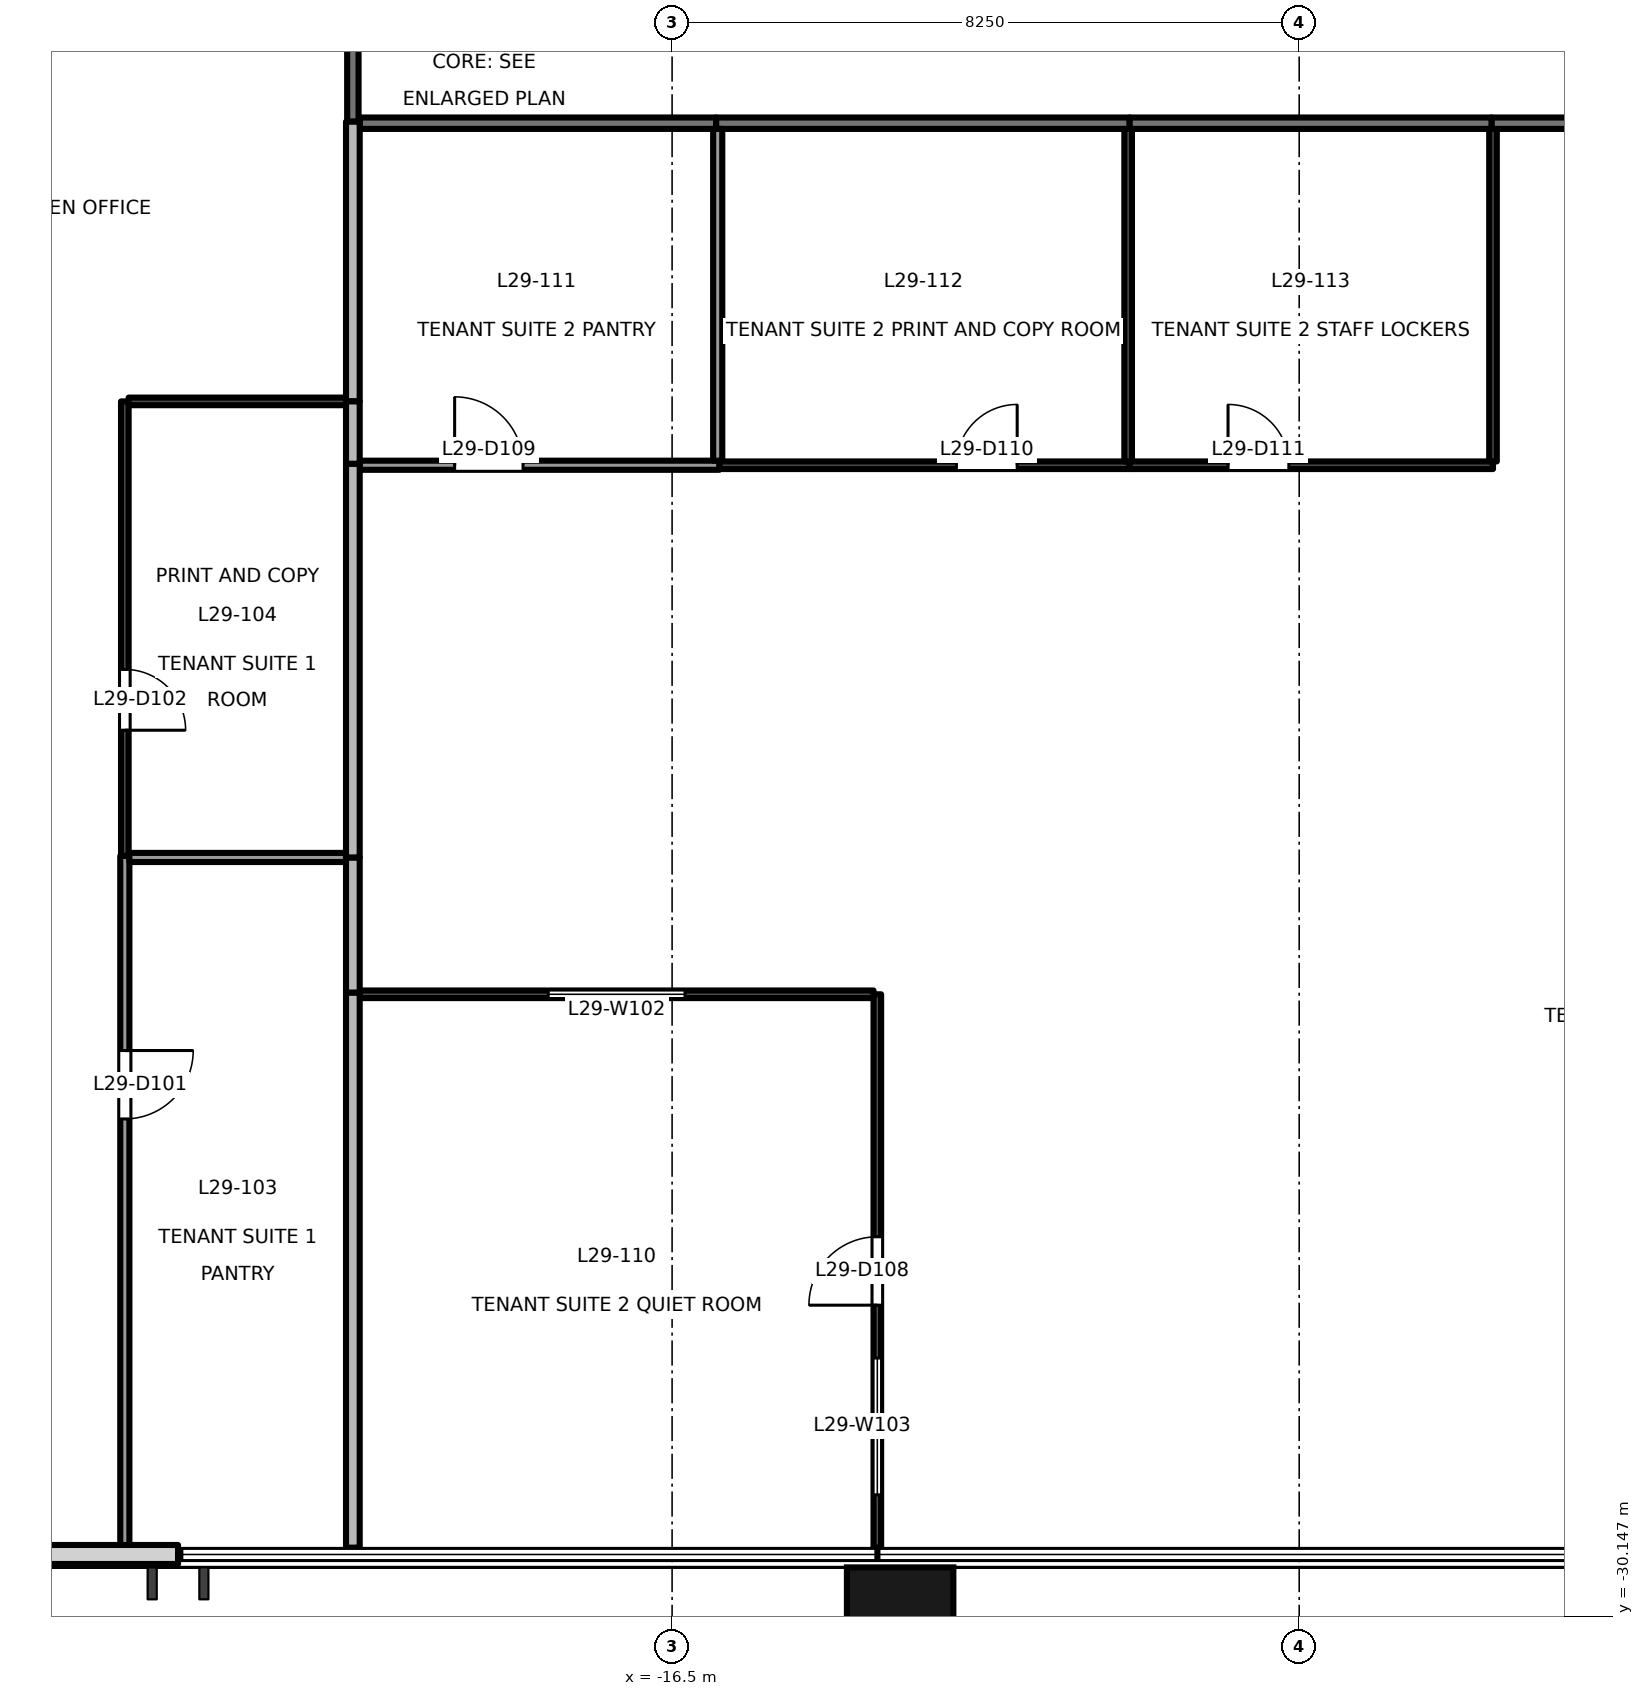
"""IFC4 building model, lengths in metres.
Left out: names, types, materials, properties, quantities, classifications, styles, units other than length and angle.
Written with IfcOpenShell. Run it as: python <this file> out.ifc"""

import sys

from ifc_helpers import new_model, si_unit, direction, frame, frame_2d, origin, origin_2d, place, context, subcontext, project, spatial, rectangle, extrude, element, fill, save


model = new_model("IFC4")
c1 = context("Model", 3, precision=1e-05, world=origin(), true_north=direction((0.0, 1.0)))
c2 = subcontext(c1, "Body", "Model", "MODEL_VIEW")
j1 = project(units=[si_unit("LENGTHUNIT", "METRE"), si_unit("PLANEANGLEUNIT", "RADIAN")], contexts=[c1])
p1 = place(None, origin())
s1 = spatial("IfcSite", under=j1, at=p1, CompositionType="ELEMENT")
p2 = place(p1, origin())
s2 = spatial("IfcBuilding", under=s1, at=p2, CompositionType="ELEMENT")
p3 = place(p2, frame((0.0, 0.0, 130.1)))
s3 = spatial("IfcBuildingStorey", under=s2, at=p3, CompositionType="ELEMENT", Elevation=130.1)
p4 = place(p3, frame((-13.5, -30.4, -0.2), z_axis=(0.0, 0.0, 1.0), x_axis=(1.0, 0.0, 0.0)))
e1 = element("IfcColumn", 1, at=p4, inside=s3, PredefinedType="COLUMN", context=c2, shape_type="SweptSolid", body=[
    extrude(rectangle(XDim=1.4, YDim=1.8, at=origin_2d()), origin(), (0.0, 0.0, 1.0), 4.0),
])
p5 = place(p3, frame((-25.955, -29.33, 0.0), z_axis=(0.0, 0.0, 1.0), x_axis=(1.0, 0.0, 0.0)))
e2 = element("IfcWall", 2, at=p5, inside=s3, PredefinedType="SOLIDWALL", context=c2, shape_type="SweptSolid", body=[
    extrude(rectangle(XDim=2.955, YDim=0.25, at=frame_2d((1.478, 0.0))), origin(), (0.0, 0.0, 1.0), 3.8),
])
p6 = place(p3, frame((-20.7, -10.48, 0.0), z_axis=(0.0, 0.0, 1.0), x_axis=(0.0, 1.0, 0.0)))
e3 = element("IfcWall", 3, at=p6, inside=s3, PredefinedType="PARTITIONING", context=c2, shape_type="SweptSolid", body=[
    extrude(rectangle(XDim=2.3, YDim=0.15, at=frame_2d((1.15, 0.0))), origin(), (0.0, 0.0, 1.0), 3.8),
])
p7 = place(p3, frame((0.32, -10.5, 0.0), z_axis=(0.0, 0.0, 1.0), x_axis=(-1.0, 0.0, 0.0)))
e4 = element("IfcWall", 4, at=p7, inside=s3, PredefinedType="PARTITIONING", context=c2, shape_type="SweptSolid", body=[
    extrude(rectangle(XDim=6.04, YDim=0.15, at=frame_2d((3.02, 0.0))), origin(), (0.0, 0.0, 1.0), 2.9),
])
p8 = place(p7, frame((2.12, 0.0, 0.0)))
e5 = element("IfcOpeningElement", 5, at=p8, cuts=e4, PredefinedType="OPENING", context=c2, shape_type="SweptSolid", body=[
    extrude(rectangle(XDim=1.8, YDim=2.1, at=frame_2d((0.9, 1.05))), frame((0.0, 0.085, 0.0), z_axis=(0.0, -1.0, 0.0), x_axis=(1.0, 0.0, 0.0)), (0.0, 0.0, 1.0), 0.171),
])
p9 = place(p3, frame((-15.92, -10.5, 0.0), z_axis=(0.0, 0.0, 1.0), x_axis=(-1.0, 0.0, 0.0)))
e6 = element("IfcWall", 6, at=p9, inside=s3, PredefinedType="PARTITIONING", context=c2, shape_type="SweptSolid", body=[
    extrude(rectangle(XDim=4.69, YDim=0.15, at=frame_2d((2.345, 0.0))), origin(), (0.0, 0.0, 1.0), 3.8),
])
p10 = place(p3, frame((-10.48, -10.5, 0.0), z_axis=(0.0, 0.0, 1.0), x_axis=(-1.0, 0.0, 0.0)))
e7 = element("IfcWall", 7, at=p10, inside=s3, PredefinedType="PARTITIONING", context=c2, shape_type="SweptSolid", body=[
    extrude(rectangle(XDim=5.44, YDim=0.15, at=frame_2d((2.72, 0.0))), origin(), (0.0, 0.0, 1.0), 2.9),
])
p11 = place(p3, frame((-5.72, -10.5, 0.0), z_axis=(0.0, 0.0, 1.0), x_axis=(-1.0, 0.0, 0.0)))
e8 = element("IfcWall", 8, at=p11, inside=s3, PredefinedType="PARTITIONING", context=c2, shape_type="SweptSolid", body=[
    extrude(rectangle(XDim=4.76, YDim=0.15, at=frame_2d((2.38, 0.0))), origin(), (0.0, 0.0, 1.0), 2.9),
])
p12 = place(p3, frame((-23.7, -20.14, 0.0), z_axis=(0.0, 0.0, 1.0), x_axis=(0.0, -1.0, 0.0)))
e9 = element("IfcWall", 9, at=p12, inside=s3, PredefinedType="PARTITIONING", context=c2, shape_type="SweptSolid", body=[
    extrude(rectangle(XDim=9.1, YDim=0.12, at=frame_2d((4.55, 0.0))), origin(), (0.0, 0.0, 1.0), 3.8),
])
p13 = place(p12, frame((2.56, 0.0, 0.0)))
e10 = element("IfcOpeningElement", 10, at=p13, cuts=e9, PredefinedType="OPENING", context=c2, shape_type="SweptSolid", body=[
    extrude(rectangle(XDim=0.9, YDim=2.1, at=frame_2d((0.45, 1.05))), frame((0.0, 0.071, 0.0), z_axis=(0.0, -1.0, 0.0), x_axis=(1.0, 0.0, 0.0)), (0.0, 0.0, 1.0), 0.141),
])
p14 = place(p3, frame((-23.7, -14.16, 0.0), z_axis=(0.0, 0.0, 1.0), x_axis=(0.0, -1.0, 0.0)))
e11 = element("IfcWall", 11, at=p14, inside=s3, PredefinedType="PARTITIONING", context=c2, shape_type="SweptSolid", body=[
    extrude(rectangle(XDim=5.98, YDim=0.1, at=frame_2d((2.99, 0.0))), origin(), (0.0, 0.0, 1.0), 3.8),
])
p15 = place(p14, frame((3.526, 0.0, 0.0)))
e12 = element("IfcOpeningElement", 12, at=p15, cuts=e11, PredefinedType="OPENING", context=c2, shape_type="SweptSolid", body=[
    extrude(rectangle(XDim=0.8, YDim=2.1, at=frame_2d((0.4, 1.05))), frame((0.0, 0.061, 0.0), z_axis=(0.0, -1.0, 0.0), x_axis=(1.0, 0.0, 0.0)), (0.0, 0.0, 1.0), 0.121),
])
p16 = place(p3, frame((-20.79, -14.16, 0.0), z_axis=(0.0, 0.0, 1.0), x_axis=(-1.0, 0.0, 0.0)))
e13 = element("IfcWall", 13, at=p16, inside=s3, PredefinedType="PARTITIONING", context=c2, shape_type="SweptSolid", body=[
    extrude(rectangle(XDim=2.86, YDim=0.1, at=frame_2d((1.43, 0.0))), origin(), (0.0, 0.0, 1.0), 3.8),
])
p17 = place(p3, frame((-20.7, -10.48, 0.0), z_axis=(0.0, 0.0, 1.0), x_axis=(0.0, -1.0, 0.0)))
e14 = element("IfcWall", 14, at=p17, inside=s3, PredefinedType="PARTITIONING", context=c2, shape_type="SweptSolid", body=[
    extrude(rectangle(XDim=3.68, YDim=0.18, at=frame_2d((1.84, 0.0))), origin(), (0.0, 0.0, 1.0), 3.8),
])
p18 = place(p3, frame((-23.64, -20.16, 0.0), z_axis=(0.0, 0.0, 1.0), x_axis=(1.0, 0.0, 0.0)))
e15 = element("IfcWall", 15, at=p18, inside=s3, PredefinedType="PARTITIONING", context=c2, shape_type="SweptSolid", body=[
    extrude(rectangle(XDim=2.85, YDim=0.12, at=frame_2d((1.425, 0.0))), origin(), (0.0, 0.0, 1.0), 3.8),
])
p19 = place(p3, frame((-20.7, -20.16, 0.0), z_axis=(0.0, 0.0, 1.0), x_axis=(0.0, -1.0, 0.0)))
e16 = element("IfcWall", 16, at=p19, inside=s3, PredefinedType="PARTITIONING", context=c2, shape_type="SweptSolid", body=[
    extrude(rectangle(XDim=1.78, YDim=0.18, at=frame_2d((0.89, 0.0))), origin(), (0.0, 0.0, 1.0), 3.8),
])
p20 = place(p3, frame((-20.7, -21.94, 0.0), z_axis=(0.0, 0.0, 1.0), x_axis=(0.0, -1.0, 0.0)))
e17 = element("IfcWall", 17, at=p20, inside=s3, PredefinedType="PARTITIONING", context=c2, shape_type="SweptSolid", body=[
    extrude(rectangle(XDim=7.3, YDim=0.18, at=frame_2d((3.65, 0.0))), origin(), (0.0, 0.0, 1.0), 3.8),
])
p21 = place(p3, frame((-20.7, -14.98, 0.0), z_axis=(0.0, 0.0, 1.0), x_axis=(0.0, -1.0, 0.0)))
e18 = element("IfcWall", 18, at=p21, inside=s3, PredefinedType="PARTITIONING", context=c2, shape_type="SweptSolid", body=[
    extrude(rectangle(XDim=5.18, YDim=0.18, at=frame_2d((2.59, 0.0))), origin(), (0.0, 0.0, 1.0), 3.8),
])
p22 = place(p3, frame((-20.7, -14.16, 0.0), z_axis=(0.0, 0.0, 1.0), x_axis=(0.0, -1.0, 0.0)))
e19 = element("IfcWall", 19, at=p22, inside=s3, PredefinedType="PARTITIONING", context=c2, shape_type="SweptSolid", body=[
    extrude(rectangle(XDim=0.82, YDim=0.18, at=frame_2d((0.41, 0.0))), origin(), (0.0, 0.0, 1.0), 3.8),
])
p23 = place(p3, frame((-13.85, -21.96, 0.0), z_axis=(0.0, 0.0, 1.0), x_axis=(-1.0, 0.0, 0.0)))
e20 = element("IfcWall", 20, at=p23, inside=s3, PredefinedType="PARTITIONING", context=c2, shape_type="SweptSolid", body=[
    extrude(rectangle(XDim=6.76, YDim=0.1, at=frame_2d((3.38, 0.0))), origin(), (0.0, 0.0, 1.0), 3.8),
])
p24 = place(p23, frame((2.48, 0.0, 0.9)))
e21 = element("IfcOpeningElement", 21, at=p24, cuts=e20, PredefinedType="OPENING", context=c2, shape_type="SweptSolid", body=[
    extrude(rectangle(XDim=1.8, YDim=1.2, at=frame_2d((0.9, 0.6))), frame((0.0, 0.061, 0.0), z_axis=(0.0, -1.0, 0.0), x_axis=(1.0, 0.0, 0.0)), (0.0, 0.0, 1.0), 0.121),
])
p25 = place(p3, frame((-13.8, -29.24, 0.0), z_axis=(0.0, 0.0, 1.0), x_axis=(0.0, 1.0, 0.0)))
e22 = element("IfcWall", 22, at=p25, inside=s3, PredefinedType="PARTITIONING", context=c2, shape_type="SweptSolid", body=[
    extrude(rectangle(XDim=7.28, YDim=0.1, at=frame_2d((3.64, 0.0))), origin(), (0.0, 0.0, 1.0), 3.8),
])
p26 = place(p25, frame((3.19, 0.0, 0.0)))
e23 = element("IfcOpeningElement", 23, at=p26, cuts=e22, PredefinedType="OPENING", context=c2, shape_type="SweptSolid", body=[
    extrude(rectangle(XDim=0.9, YDim=2.1, at=frame_2d((0.45, 1.05))), frame((0.0, 0.061, 0.0), z_axis=(0.0, -1.0, 0.0), x_axis=(1.0, 0.0, 0.0)), (0.0, 0.0, 1.0), 0.121),
])
p27 = place(p25, frame((0.695, 0.0, 0.9)))
e24 = element("IfcOpeningElement", 24, at=p27, cuts=e22, PredefinedType="OPENING", context=c2, shape_type="SweptSolid", body=[
    extrude(rectangle(XDim=1.8, YDim=1.2, at=frame_2d((0.9, 0.6))), frame((0.0, 0.061, 0.0), z_axis=(0.0, -1.0, 0.0), x_axis=(1.0, 0.0, 0.0)), (0.0, 0.0, 1.0), 0.121),
])
p28 = place(p3, frame((-20.61, -15.0, 0.0), z_axis=(0.0, 0.0, 1.0), x_axis=(1.0, 0.0, 0.0)))
e25 = element("IfcWall", 25, at=p28, inside=s3, PredefinedType="PARTITIONING", context=c2, shape_type="SweptSolid", body=[
    extrude(rectangle(XDim=4.73, YDim=0.12, at=frame_2d((2.365, 0.0))), origin(), (0.0, 0.0, 1.0), 3.8),
])
p29 = place(p28, frame((1.249, 0.0, 0.0)))
e26 = element("IfcOpeningElement", 26, at=p29, cuts=e25, PredefinedType="OPENING", context=c2, shape_type="SweptSolid", body=[
    extrude(rectangle(XDim=0.9, YDim=2.1, at=frame_2d((0.45, 1.05))), frame((0.0, 0.071, 0.0), z_axis=(0.0, -1.0, 0.0), x_axis=(1.0, 0.0, 0.0)), (0.0, 0.0, 1.0), 0.141),
])
p30 = place(p3, frame((-15.88, -15.0, 0.0), z_axis=(0.0, 0.0, 1.0), x_axis=(1.0, 0.0, 0.0)))
e27 = element("IfcWall", 27, at=p30, inside=s3, PredefinedType="PARTITIONING", context=c2, shape_type="SweptSolid", body=[
    extrude(rectangle(XDim=5.4, YDim=0.1, at=frame_2d((2.7, 0.0))), origin(), (0.0, 0.0, 1.0), 2.9),
])
p31 = place(p30, frame((3.12, 0.0, 0.0)))
e28 = element("IfcOpeningElement", 28, at=p31, cuts=e27, PredefinedType="OPENING", context=c2, shape_type="SweptSolid", body=[
    extrude(rectangle(XDim=0.8, YDim=2.1, at=frame_2d((0.4, 1.05))), frame((0.0, 0.061, 0.0), z_axis=(0.0, -1.0, 0.0), x_axis=(1.0, 0.0, 0.0)), (0.0, 0.0, 1.0), 0.121),
])
p32 = place(p3, frame((-10.48, -15.0, 0.0), z_axis=(0.0, 0.0, 1.0), x_axis=(1.0, 0.0, 0.0)))
e29 = element("IfcWall", 29, at=p32, inside=s3, PredefinedType="PARTITIONING", context=c2, shape_type="SweptSolid", body=[
    extrude(rectangle(XDim=4.78, YDim=0.1, at=frame_2d((2.39, 0.0))), origin(), (0.0, 0.0, 1.0), 2.9),
])
p33 = place(p32, frame((1.294, 0.0, 0.0)))
e30 = element("IfcOpeningElement", 30, at=p33, cuts=e29, PredefinedType="OPENING", context=c2, shape_type="SweptSolid", body=[
    extrude(rectangle(XDim=0.8, YDim=2.1, at=frame_2d((0.4, 1.05))), frame((0.0, 0.061, 0.0), z_axis=(0.0, -1.0, 0.0), x_axis=(1.0, 0.0, 0.0)), (0.0, 0.0, 1.0), 0.121),
])
p34 = place(p3, frame((-5.7, -14.95, 0.0), z_axis=(0.0, 0.0, 1.0), x_axis=(0.0, 1.0, 0.0)))
e31 = element("IfcWall", 31, at=p34, inside=s3, PredefinedType="PARTITIONING", context=c2, shape_type="SweptSolid", body=[
    extrude(rectangle(XDim=4.375, YDim=0.1, at=frame_2d((2.188, 0.0))), origin(), (0.0, 0.0, 1.0), 3.8),
])
p35 = place(p3, frame((-15.9, -10.575, 0.0), z_axis=(0.0, 0.0, 1.0), x_axis=(0.0, -1.0, 0.0)))
e32 = element("IfcWall", 32, at=p35, inside=s3, PredefinedType="PARTITIONING", context=c2, shape_type="SweptSolid", body=[
    extrude(rectangle(XDim=4.365, YDim=0.12, at=frame_2d((2.183, 0.0))), origin(), (0.0, 0.0, 1.0), 3.8),
])
p36 = place(p3, frame((-10.5, -10.575, 0.0), z_axis=(0.0, 0.0, 1.0), x_axis=(0.0, -1.0, 0.0)))
e33 = element("IfcWall", 33, at=p36, inside=s3, PredefinedType="PARTITIONING", context=c2, shape_type="SweptSolid", body=[
    extrude(rectangle(XDim=4.375, YDim=0.1, at=frame_2d((2.188, 0.0))), origin(), (0.0, 0.0, 1.0), 3.8),
])
p37 = place(p13, origin())
e34 = element("IfcDoor", 34, at=p37, inside=s3, OperationType="SINGLE_SWING_LEFT", PredefinedType="DOOR", context=c2, shape_type="SweptSolid", body=[
    extrude(rectangle(XDim=0.9, YDim=2.1, at=frame_2d((0.45, 1.05))), frame((0.0, 0.025, 0.0), z_axis=(0.0, -1.0, 0.0), x_axis=(1.0, 0.0, 0.0)), (0.0, 0.0, 1.0), 0.05),
])
fill(e10, e34)
p38 = place(p15, origin())
e35 = element("IfcDoor", 35, at=p38, inside=s3, OperationType="SINGLE_SWING_RIGHT", PredefinedType="DOOR", context=c2, shape_type="SweptSolid", body=[
    extrude(rectangle(XDim=0.8, YDim=2.1, at=frame_2d((0.4, 1.05))), frame((0.0, 0.025, 0.0), z_axis=(0.0, -1.0, 0.0), x_axis=(1.0, 0.0, 0.0)), (0.0, 0.0, 1.0), 0.05),
])
fill(e12, e35)
p39 = place(p26, origin())
e36 = element("IfcDoor", 36, at=p39, inside=s3, OperationType="SINGLE_SWING_LEFT", PredefinedType="DOOR", context=c2, shape_type="SweptSolid", body=[
    extrude(rectangle(XDim=0.9, YDim=2.1, at=frame_2d((0.45, 1.05))), frame((0.0, 0.025, 0.0), z_axis=(0.0, -1.0, 0.0), x_axis=(1.0, 0.0, 0.0)), (0.0, 0.0, 1.0), 0.05),
])
fill(e23, e36)
p40 = place(p29, origin())
e37 = element("IfcDoor", 37, at=p40, inside=s3, OperationType="SINGLE_SWING_LEFT", PredefinedType="DOOR", context=c2, shape_type="SweptSolid", body=[
    extrude(rectangle(XDim=0.9, YDim=2.1, at=frame_2d((0.45, 1.05))), frame((0.0, 0.025, 0.0), z_axis=(0.0, -1.0, 0.0), x_axis=(1.0, 0.0, 0.0)), (0.0, 0.0, 1.0), 0.05),
])
fill(e26, e37)
p41 = place(p31, origin())
e38 = element("IfcDoor", 38, at=p41, inside=s3, OperationType="SINGLE_SWING_RIGHT", PredefinedType="DOOR", context=c2, shape_type="SweptSolid", body=[
    extrude(rectangle(XDim=0.8, YDim=2.1, at=frame_2d((0.4, 1.05))), frame((0.0, 0.025, 0.0), z_axis=(0.0, -1.0, 0.0), x_axis=(1.0, 0.0, 0.0)), (0.0, 0.0, 1.0), 0.05),
])
fill(e28, e38)
p42 = place(p33, origin())
e39 = element("IfcDoor", 39, at=p42, inside=s3, OperationType="SINGLE_SWING_LEFT", PredefinedType="DOOR", context=c2, shape_type="SweptSolid", body=[
    extrude(rectangle(XDim=0.8, YDim=2.1, at=frame_2d((0.4, 1.05))), frame((0.0, 0.025, 0.0), z_axis=(0.0, -1.0, 0.0), x_axis=(1.0, 0.0, 0.0)), (0.0, 0.0, 1.0), 0.05),
])
fill(e30, e39)
p43 = place(p24, origin())
e40 = element("IfcWindow", 40, at=p43, inside=s3, PartitioningType="SINGLE_PANEL", PredefinedType="WINDOW", context=c2, shape_type="SweptSolid", body=[
    extrude(rectangle(XDim=1.8, YDim=1.2, at=frame_2d((0.9, 0.6))), frame((0.0, 0.03, 0.0), z_axis=(0.0, -1.0, 0.0), x_axis=(1.0, 0.0, 0.0)), (0.0, 0.0, 1.0), 0.06),
])
fill(e21, e40)
p44 = place(p27, origin())
e41 = element("IfcWindow", 41, at=p44, inside=s3, PartitioningType="SINGLE_PANEL", PredefinedType="WINDOW", context=c2, shape_type="SweptSolid", body=[
    extrude(rectangle(XDim=1.8, YDim=1.2, at=frame_2d((0.9, 0.6))), frame((0.0, 0.03, 0.0), z_axis=(0.0, -1.0, 0.0), x_axis=(1.0, 0.0, 0.0)), (0.0, 0.0, 1.0), 0.06),
])
fill(e24, e41)
save(model, sys.argv[1])
